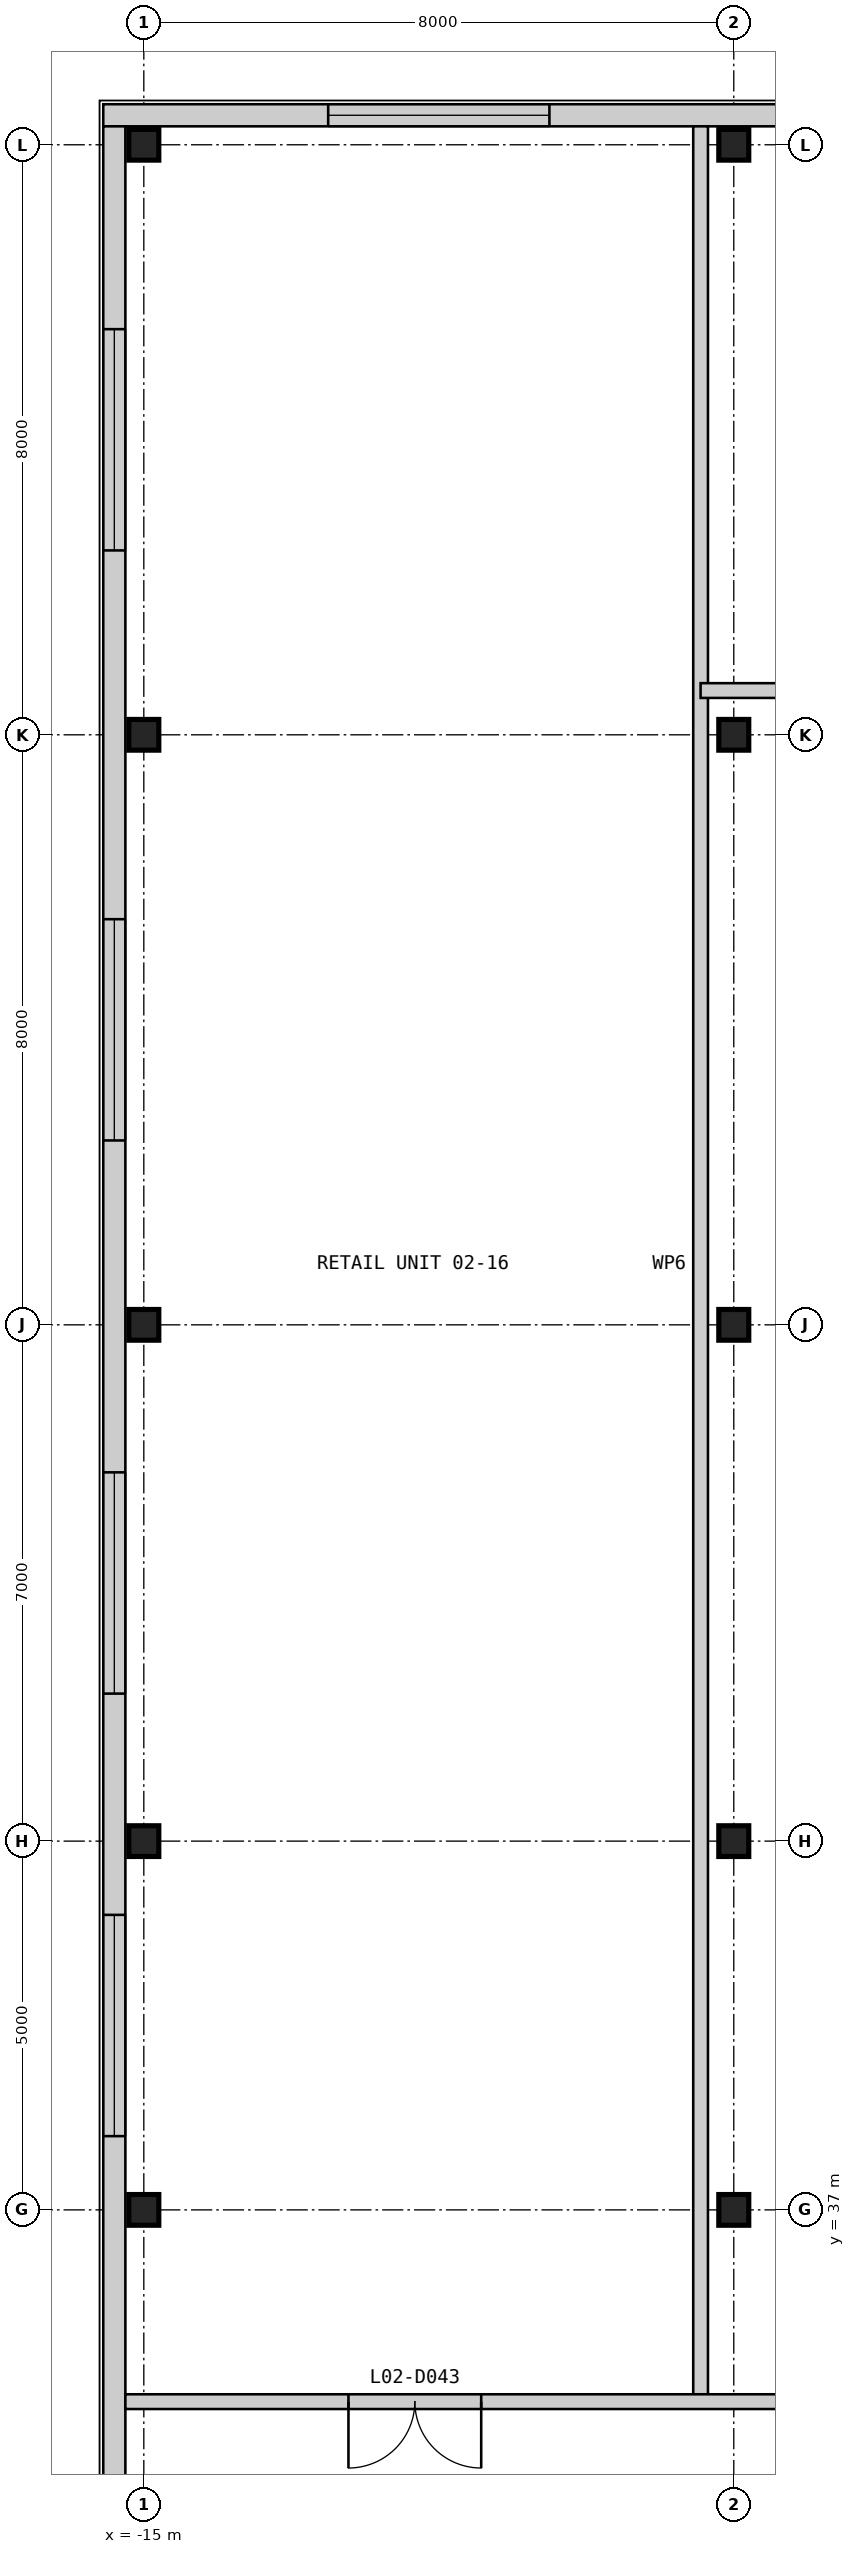
"""IFC4 building model, lengths in metres.
Left out: names, types, materials, properties, quantities, classifications, styles, units other than length and angle.
Written with IfcOpenShell. Run it as: python <this file> out.ifc"""

import sys

from ifc_helpers import new_model, si_unit, direction, frame, frame_2d, origin, origin_2d, place, context, subcontext, project, spatial, rectangle, i_section, extrude, element, fill, save


model = new_model("IFC4")
c1 = context("Model", 3, precision=1e-05, world=origin(), true_north=direction((0.0, 1.0)))
c2 = subcontext(c1, "Body", "Model", "MODEL_VIEW")
j1 = project(units=[si_unit("LENGTHUNIT", "METRE"), si_unit("PLANEANGLEUNIT", "RADIAN")], contexts=[c1])
p1 = place(None, origin())
s1 = spatial("IfcSite", under=j1, at=p1, CompositionType="ELEMENT")
p2 = place(p1, origin())
s2 = spatial("IfcBuilding", under=s1, at=p2, CompositionType="ELEMENT")
p3 = place(p2, frame((0.0, 0.0, 11.8)))
s3 = spatial("IfcBuildingStorey", under=s2, at=p3, CompositionType="ELEMENT", Elevation=11.8)
for number, where, z_axis, x_axis in (
    (1, (-15.0, 37.0, 0.0), (0.0, 0.0, 1.0), (1.0, 0.0, 0.0)),
    (2, (-15.0, 42.0, 0.0), (0.0, 0.0, 1.0), (1.0, 0.0, 0.0)),
    (3, (-15.0, 49.0, 0.0), (0.0, 0.0, 1.0), (1.0, 0.0, 0.0)),
    (4, (-15.0, 57.0, 0.0), (0.0, 0.0, 1.0), (1.0, 0.0, 0.0)),
    (5, (-15.0, 65.0, 0.0), (0.0, 0.0, 1.0), (1.0, 0.0, 0.0)),
    (6, (-7.0, 37.0, 0.0), (0.0, 0.0, 1.0), (1.0, 0.0, 0.0)),
    (7, (-7.0, 42.0, 0.0), (0.0, 0.0, 1.0), (1.0, 0.0, 0.0)),
    (8, (-7.0, 49.0, 0.0), (0.0, 0.0, 1.0), (1.0, 0.0, 0.0)),
    (9, (-7.0, 57.0, 0.0), (0.0, 0.0, 1.0), (1.0, 0.0, 0.0)),
    (10, (-7.0, 65.0, 0.0), (0.0, 0.0, 1.0), (1.0, 0.0, 0.0)),
):
    element("IfcColumn", number, at=place(p3, frame(where, z_axis=z_axis, x_axis=x_axis)), inside=s3, PredefinedType="COLUMN", context=c2, shape_type="SweptSolid", body=[
        extrude(i_section(OverallWidth=0.406, OverallDepth=0.417, WebThickness=0.03, FlangeThickness=0.048, at=origin_2d()), origin(), (0.0, 0.0, 1.0), 4.8),
    ])
p4 = place(p3, frame((57.55, 65.4, 0.0), z_axis=(0.0, 0.0, 1.0), x_axis=(-1.0, 0.0, 0.0)))
e11 = element("IfcWall", 11, at=p4, inside=s3, PredefinedType="SOLIDWALL", context=c2, shape_type="SweptSolid", body=[
    extrude(rectangle(XDim=73.1, YDim=0.3, at=frame_2d((36.55, 0.0))), origin(), (0.0, 0.0, 1.0), 4.5),
])
p5 = place(p4, frame((67.05, 0.0, 0.9)))
e12 = element("IfcOpeningElement", 12, at=p5, cuts=e11, PredefinedType="OPENING", context=c2, shape_type="SweptSolid", body=[
    extrude(rectangle(XDim=3.0, YDim=2.4, at=frame_2d((1.5, 1.2))), frame((0.0, 0.16, 0.0), z_axis=(0.0, -1.0, 0.0), x_axis=(1.0, 0.0, 0.0)), (0.0, 0.0, 1.0), 0.32),
])
p6 = place(p4, frame((59.05, 0.0, 0.9)))
e13 = element("IfcOpeningElement", 13, at=p6, cuts=e11, PredefinedType="OPENING", context=c2, shape_type="SweptSolid", body=[
    extrude(rectangle(XDim=3.0, YDim=2.4, at=frame_2d((1.5, 1.2))), frame((0.0, 0.16, 0.0), z_axis=(0.0, -1.0, 0.0), x_axis=(1.0, 0.0, 0.0)), (0.0, 0.0, 1.0), 0.32),
])
p7 = place(p4, frame((51.05, 0.0, 0.9)))
e14 = element("IfcOpeningElement", 14, at=p7, cuts=e11, PredefinedType="OPENING", context=c2, shape_type="SweptSolid", body=[
    extrude(rectangle(XDim=3.0, YDim=2.4, at=frame_2d((1.5, 1.2))), frame((0.0, 0.16, 0.0), z_axis=(0.0, -1.0, 0.0), x_axis=(1.0, 0.0, 0.0)), (0.0, 0.0, 1.0), 0.32),
])
p8 = place(p4, frame((37.05, 0.0, 0.9)))
e15 = element("IfcOpeningElement", 15, at=p8, cuts=e11, PredefinedType="OPENING", context=c2, shape_type="SweptSolid", body=[
    extrude(rectangle(XDim=3.0, YDim=2.4, at=frame_2d((1.5, 1.2))), frame((0.0, 0.16, 0.0), z_axis=(0.0, -1.0, 0.0), x_axis=(1.0, 0.0, 0.0)), (0.0, 0.0, 1.0), 0.32),
])
p9 = place(p4, frame((25.05, 0.0, 0.9)))
e16 = element("IfcOpeningElement", 16, at=p9, cuts=e11, PredefinedType="OPENING", context=c2, shape_type="SweptSolid", body=[
    extrude(rectangle(XDim=3.0, YDim=2.4, at=frame_2d((1.5, 1.2))), frame((0.0, 0.16, 0.0), z_axis=(0.0, -1.0, 0.0), x_axis=(1.0, 0.0, 0.0)), (0.0, 0.0, 1.0), 0.32),
])
p10 = place(p4, frame((16.55, 0.0, 0.9)))
e17 = element("IfcOpeningElement", 17, at=p10, cuts=e11, PredefinedType="OPENING", context=c2, shape_type="SweptSolid", body=[
    extrude(rectangle(XDim=3.0, YDim=2.4, at=frame_2d((1.5, 1.2))), frame((0.0, 0.16, 0.0), z_axis=(0.0, -1.0, 0.0), x_axis=(1.0, 0.0, 0.0)), (0.0, 0.0, 1.0), 0.32),
])
p11 = place(p4, frame((10.55, 0.0, 0.9)))
e18 = element("IfcOpeningElement", 18, at=p11, cuts=e11, PredefinedType="OPENING", context=c2, shape_type="SweptSolid", body=[
    extrude(rectangle(XDim=3.0, YDim=2.4, at=frame_2d((1.5, 1.2))), frame((0.0, 0.16, 0.0), z_axis=(0.0, -1.0, 0.0), x_axis=(1.0, 0.0, 0.0)), (0.0, 0.0, 1.0), 0.32),
])
p12 = place(p4, frame((3.05, 0.0, 0.9)))
e19 = element("IfcOpeningElement", 19, at=p12, cuts=e11, PredefinedType="OPENING", context=c2, shape_type="SweptSolid", body=[
    extrude(rectangle(XDim=3.0, YDim=2.4, at=frame_2d((1.5, 1.2))), frame((0.0, 0.16, 0.0), z_axis=(0.0, -1.0, 0.0), x_axis=(1.0, 0.0, 0.0)), (0.0, 0.0, 1.0), 0.32),
])
p13 = place(p3, frame((-15.4, 65.25, 0.0), z_axis=(0.0, 0.0, 1.0), x_axis=(0.0, -1.0, 0.0)))
e20 = element("IfcWall", 20, at=p13, inside=s3, PredefinedType="SOLIDWALL", context=c2, shape_type="SweptSolid", body=[
    extrude(rectangle(XDim=72.5, YDim=0.3, at=frame_2d((36.25, 0.0))), origin(), (0.0, 0.0, 1.0), 4.5),
])
p14 = place(p13, frame((66.75, 0.0, 0.9)))
e21 = element("IfcOpeningElement", 21, at=p14, cuts=e20, PredefinedType="OPENING", context=c2, shape_type="SweptSolid", body=[
    extrude(rectangle(XDim=3.0, YDim=2.4, at=frame_2d((1.5, 1.2))), frame((0.0, 0.16, 0.0), z_axis=(0.0, -1.0, 0.0), x_axis=(1.0, 0.0, 0.0)), (0.0, 0.0, 1.0), 0.32),
])
p15 = place(p13, frame((58.75, 0.0, 0.9)))
e22 = element("IfcOpeningElement", 22, at=p15, cuts=e20, PredefinedType="OPENING", context=c2, shape_type="SweptSolid", body=[
    extrude(rectangle(XDim=3.0, YDim=2.4, at=frame_2d((1.5, 1.2))), frame((0.0, 0.16, 0.0), z_axis=(0.0, -1.0, 0.0), x_axis=(1.0, 0.0, 0.0)), (0.0, 0.0, 1.0), 0.32),
])
p16 = place(p13, frame((44.75, 0.0, 0.9)))
e23 = element("IfcOpeningElement", 23, at=p16, cuts=e20, PredefinedType="OPENING", context=c2, shape_type="SweptSolid", body=[
    extrude(rectangle(XDim=3.0, YDim=2.4, at=frame_2d((1.5, 1.2))), frame((0.0, 0.16, 0.0), z_axis=(0.0, -1.0, 0.0), x_axis=(1.0, 0.0, 0.0)), (0.0, 0.0, 1.0), 0.32),
])
p17 = place(p13, frame((32.75, 0.0, 0.9)))
e24 = element("IfcOpeningElement", 24, at=p17, cuts=e20, PredefinedType="OPENING", context=c2, shape_type="SweptSolid", body=[
    extrude(rectangle(XDim=3.0, YDim=2.4, at=frame_2d((1.5, 1.2))), frame((0.0, 0.16, 0.0), z_axis=(0.0, -1.0, 0.0), x_axis=(1.0, 0.0, 0.0)), (0.0, 0.0, 1.0), 0.32),
])
p18 = place(p13, frame((24.25, 0.0, 0.9)))
e25 = element("IfcOpeningElement", 25, at=p18, cuts=e20, PredefinedType="OPENING", context=c2, shape_type="SweptSolid", body=[
    extrude(rectangle(XDim=3.0, YDim=2.4, at=frame_2d((1.5, 1.2))), frame((0.0, 0.16, 0.0), z_axis=(0.0, -1.0, 0.0), x_axis=(1.0, 0.0, 0.0)), (0.0, 0.0, 1.0), 0.32),
])
p19 = place(p13, frame((18.25, 0.0, 0.9)))
e26 = element("IfcOpeningElement", 26, at=p19, cuts=e20, PredefinedType="OPENING", context=c2, shape_type="SweptSolid", body=[
    extrude(rectangle(XDim=3.0, YDim=2.4, at=frame_2d((1.5, 1.2))), frame((0.0, 0.16, 0.0), z_axis=(0.0, -1.0, 0.0), x_axis=(1.0, 0.0, 0.0)), (0.0, 0.0, 1.0), 0.32),
])
p20 = place(p13, frame((10.75, 0.0, 0.9)))
e27 = element("IfcOpeningElement", 27, at=p20, cuts=e20, PredefinedType="OPENING", context=c2, shape_type="SweptSolid", body=[
    extrude(rectangle(XDim=3.0, YDim=2.4, at=frame_2d((1.5, 1.2))), frame((0.0, 0.16, 0.0), z_axis=(0.0, -1.0, 0.0), x_axis=(1.0, 0.0, 0.0)), (0.0, 0.0, 1.0), 0.32),
])
p21 = place(p13, frame((2.75, 0.0, 0.9)))
e28 = element("IfcOpeningElement", 28, at=p21, cuts=e20, PredefinedType="OPENING", context=c2, shape_type="SweptSolid", body=[
    extrude(rectangle(XDim=3.0, YDim=2.4, at=frame_2d((1.5, 1.2))), frame((0.0, 0.16, 0.0), z_axis=(0.0, -1.0, 0.0), x_axis=(1.0, 0.0, 0.0)), (0.0, 0.0, 1.0), 0.32),
])
p22 = place(p3, frame((-7.45, 34.4, 0.0), z_axis=(0.0, 0.0, 1.0), x_axis=(0.0, 1.0, 0.0)))
e29 = element("IfcWall", 29, at=p22, inside=s3, PredefinedType="PARTITIONING", context=c2, shape_type="SweptSolid", body=[
    extrude(rectangle(XDim=30.85, YDim=0.2, at=frame_2d((15.425, 0.0))), origin(), (0.0, 0.0, 1.0), 4.5),
])
p23 = place(p3, frame((-15.25, 34.4, 0.0), z_axis=(0.0, 0.0, 1.0), x_axis=(1.0, 0.0, 0.0)))
e30 = element("IfcWall", 30, at=p23, inside=s3, PredefinedType="PARTITIONING", context=c2, shape_type="SweptSolid", body=[
    extrude(rectangle(XDim=22.25, YDim=0.2, at=frame_2d((11.125, 0.0))), origin(), (0.0, 0.0, 1.0), 4.5),
])
p24 = place(p23, frame((17.525, 0.0, 0.0)))
e31 = element("IfcOpeningElement", 31, at=p24, cuts=e30, PredefinedType="OPENING", context=c2, shape_type="SweptSolid", body=[
    extrude(rectangle(XDim=1.8, YDim=2.4, at=frame_2d((0.9, 1.2))), frame((0.0, 0.11, 0.0), z_axis=(0.0, -1.0, 0.0), x_axis=(1.0, 0.0, 0.0)), (0.0, 0.0, 1.0), 0.22),
])
p25 = place(p23, frame((10.325, 0.0, 0.0)))
e32 = element("IfcOpeningElement", 32, at=p25, cuts=e30, PredefinedType="OPENING", context=c2, shape_type="SweptSolid", body=[
    extrude(rectangle(XDim=1.8, YDim=2.4, at=frame_2d((0.9, 1.2))), frame((0.0, 0.11, 0.0), z_axis=(0.0, -1.0, 0.0), x_axis=(1.0, 0.0, 0.0)), (0.0, 0.0, 1.0), 0.22),
])
p26 = place(p23, frame((3.025, 0.0, 0.0)))
e33 = element("IfcOpeningElement", 33, at=p26, cuts=e30, PredefinedType="OPENING", context=c2, shape_type="SweptSolid", body=[
    extrude(rectangle(XDim=1.8, YDim=2.4, at=frame_2d((0.9, 1.2))), frame((0.0, 0.11, 0.0), z_axis=(0.0, -1.0, 0.0), x_axis=(1.0, 0.0, 0.0)), (0.0, 0.0, 1.0), 0.22),
])
p27 = place(p3, frame((-7.45, 57.6, 0.0), z_axis=(0.0, 0.0, 1.0), x_axis=(1.0, 0.0, 0.0)))
e34 = element("IfcWall", 34, at=p27, inside=s3, PredefinedType="PARTITIONING", context=c2, shape_type="SweptSolid", body=[
    extrude(rectangle(XDim=19.05, YDim=0.2, at=frame_2d((9.525, 0.0))), origin(), (0.0, 0.0, 1.0), 4.5),
])
p28 = place(p5, origin())
e35 = element("IfcWindow", 35, at=p28, inside=s3, PartitioningType="SINGLE_PANEL", PredefinedType="WINDOW", context=c2, shape_type="SweptSolid", body=[
    extrude(rectangle(XDim=3.0, YDim=2.4, at=frame_2d((1.5, 1.2))), frame((0.0, 0.03, 0.0), z_axis=(0.0, -1.0, 0.0), x_axis=(1.0, 0.0, 0.0)), (0.0, 0.0, 1.0), 0.06),
])
fill(e12, e35)
p29 = place(p18, origin())
e36 = element("IfcWindow", 36, at=p29, inside=s3, PartitioningType="SINGLE_PANEL", PredefinedType="WINDOW", context=c2, shape_type="SweptSolid", body=[
    extrude(rectangle(XDim=3.0, YDim=2.4, at=frame_2d((1.5, 1.2))), frame((0.0, 0.03, 0.0), z_axis=(0.0, -1.0, 0.0), x_axis=(1.0, 0.0, 0.0)), (0.0, 0.0, 1.0), 0.06),
])
fill(e25, e36)
p30 = place(p19, origin())
e37 = element("IfcWindow", 37, at=p30, inside=s3, PartitioningType="SINGLE_PANEL", PredefinedType="WINDOW", context=c2, shape_type="SweptSolid", body=[
    extrude(rectangle(XDim=3.0, YDim=2.4, at=frame_2d((1.5, 1.2))), frame((0.0, 0.03, 0.0), z_axis=(0.0, -1.0, 0.0), x_axis=(1.0, 0.0, 0.0)), (0.0, 0.0, 1.0), 0.06),
])
fill(e26, e37)
p31 = place(p20, origin())
e38 = element("IfcWindow", 38, at=p31, inside=s3, PartitioningType="SINGLE_PANEL", PredefinedType="WINDOW", context=c2, shape_type="SweptSolid", body=[
    extrude(rectangle(XDim=3.0, YDim=2.4, at=frame_2d((1.5, 1.2))), frame((0.0, 0.03, 0.0), z_axis=(0.0, -1.0, 0.0), x_axis=(1.0, 0.0, 0.0)), (0.0, 0.0, 1.0), 0.06),
])
fill(e27, e38)
p32 = place(p21, origin())
e39 = element("IfcWindow", 39, at=p32, inside=s3, PartitioningType="SINGLE_PANEL", PredefinedType="WINDOW", context=c2, shape_type="SweptSolid", body=[
    extrude(rectangle(XDim=3.0, YDim=2.4, at=frame_2d((1.5, 1.2))), frame((0.0, 0.03, 0.0), z_axis=(0.0, -1.0, 0.0), x_axis=(1.0, 0.0, 0.0)), (0.0, 0.0, 1.0), 0.06),
])
fill(e28, e39)
p33 = place(p26, frame((1.8, 0.0, 0.0), z_axis=(0.0, 0.0, 1.0), x_axis=(-1.0, 0.0, 0.0)))
e40 = element("IfcDoor", 40, at=p33, inside=s3, OperationType="DOUBLE_DOOR_SINGLE_SWING", PredefinedType="DOOR", context=c2, shape_type="SweptSolid", body=[
    extrude(rectangle(XDim=1.8, YDim=2.4, at=frame_2d((0.9, 1.2))), frame((0.0, 0.025, 0.0), z_axis=(0.0, -1.0, 0.0), x_axis=(1.0, 0.0, 0.0)), (0.0, 0.0, 1.0), 0.05),
])
fill(e33, e40)
save(model, sys.argv[1])
